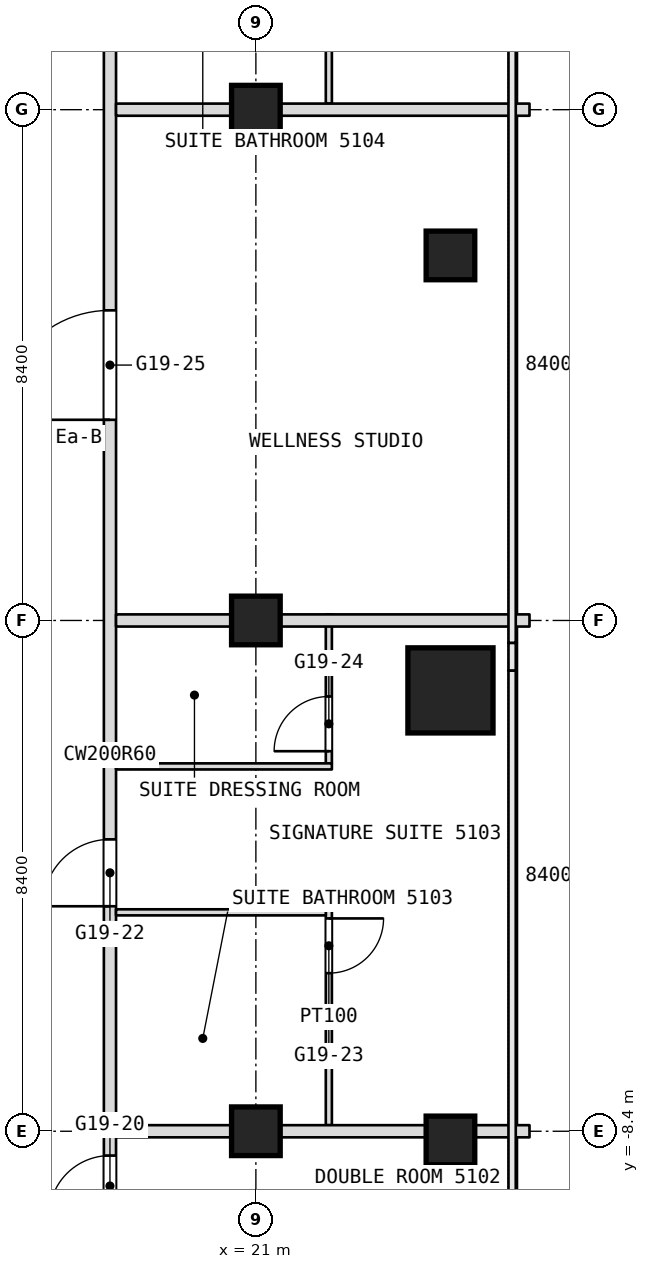
"""IFC4 building model, lengths in metres.
Left out: names, types, materials, properties, quantities, classifications, styles, units other than length and angle.
Written with IfcOpenShell. Run it as: python <this file> out.ifc"""

import sys

from ifc_helpers import new_model, si_unit, direction, frame, frame_2d, origin, origin_2d, place, context, subcontext, project, spatial, rectangle, extrude, element, fill, save


model = new_model("IFC4")
c1 = context("Model", 3, precision=1e-05, world=origin(), true_north=direction((0.0, 1.0)))
c2 = subcontext(c1, "Body", "Model", "MODEL_VIEW")
j1 = project(units=[si_unit("LENGTHUNIT", "METRE"), si_unit("PLANEANGLEUNIT", "RADIAN")], contexts=[c1])
p1 = place(None, origin())
s1 = spatial("IfcSite", under=j1, at=p1, CompositionType="ELEMENT")
p2 = place(p1, origin())
s2 = spatial("IfcBuilding", under=s1, at=p2, CompositionType="ELEMENT")
p3 = place(p2, frame((0.0, 0.0, 220.1)))
s3 = spatial("IfcBuildingStorey", under=s2, at=p3, CompositionType="ELEMENT", Elevation=220.1)
p4 = place(p3, frame((24.2, -1.15, 0.0), z_axis=(0.0, 0.0, 1.0), x_axis=(1.0, 0.0, 0.0)))
e1 = element("IfcColumn", 1, at=p4, inside=s3, PredefinedType="COLUMN", context=c2, shape_type="SweptSolid", body=[
    extrude(rectangle(XDim=1.4, YDim=1.4, at=origin_2d()), origin(), (0.0, 0.0, 1.0), 3.6),
])
for number, where, z_axis, x_axis in (
    (2, (21.0, -8.4, 0.0), (0.0, 0.0, 1.0), (1.0, 0.0, 0.0)),
    (3, (21.0, 0.0, 0.0), (0.0, 0.0, 1.0), (1.0, 0.0, 0.0)),
    (4, (21.0, 8.4, 0.0), (0.0, 0.0, 1.0), (1.0, 0.0, 0.0)),
    (5, (24.2, 6.003, 0.0), (0.0, 0.0, 1.0), (1.0, 0.0, 0.0)),
    (6, (24.2, -8.551, 0.0), (0.0, 0.0, 1.0), (1.0, 0.0, 0.0)),
):
    element("IfcColumn", number, at=place(p3, frame(where, z_axis=z_axis, x_axis=x_axis)), inside=s3, PredefinedType="COLUMN", context=c2, shape_type="SweptSolid", body=[
        extrude(rectangle(XDim=0.8, YDim=0.8, at=origin_2d()), origin(), (0.0, 0.0, 1.0), 3.6),
    ])
p5 = place(p3, frame((22.2, -8.3, 0.0), z_axis=(0.0, 0.0, 1.0), x_axis=(0.0, 1.0, 0.0)))
e7 = element("IfcWall", 7, at=p5, inside=s3, PredefinedType="PARTITIONING", context=c2, shape_type="SweptSolid", body=[
    extrude(rectangle(XDim=3.55, YDim=0.1, at=frame_2d((1.775, 0.0))), origin(), (0.0, 0.0, 1.0), 3.34),
])
p6 = place(p5, frame((2.5, 0.0, 0.0)))
e8 = element("IfcOpeningElement", 8, at=p6, cuts=e7, PredefinedType="OPENING", context=c2, shape_type="SweptSolid", body=[
    extrude(rectangle(XDim=0.9, YDim=2.1, at=frame_2d((0.45, 1.05))), frame((0.0, 0.05, 0.0), z_axis=(0.0, -1.0, 0.0), x_axis=(1.0, 0.0, 0.0)), (0.0, 0.0, 1.0), 0.1),
])
p7 = place(p3, frame((22.2, -2.35, 0.0), z_axis=(0.0, 0.0, 1.0), x_axis=(0.0, 1.0, 0.0)))
e9 = element("IfcWall", 9, at=p7, inside=s3, PredefinedType="PARTITIONING", context=c2, shape_type="SweptSolid", body=[
    extrude(rectangle(XDim=2.45, YDim=0.1, at=frame_2d((1.225, 0.0))), origin(), (0.0, 0.0, 1.0), 3.34),
])
p8 = place(p7, frame((0.2, 0.0, 0.0)))
e10 = element("IfcOpeningElement", 10, at=p8, cuts=e9, PredefinedType="OPENING", context=c2, shape_type="SweptSolid", body=[
    extrude(rectangle(XDim=0.9, YDim=2.1, at=frame_2d((0.45, 1.05))), frame((0.0, 0.05, 0.0), z_axis=(0.0, -1.0, 0.0), x_axis=(1.0, 0.0, 0.0)), (0.0, 0.0, 1.0), 0.1),
])
p9 = place(p3, frame((22.2, 8.5, 0.0), z_axis=(0.0, 0.0, 1.0), x_axis=(0.0, 1.0, 0.0)))
e11 = element("IfcWall", 11, at=p9, inside=s3, PredefinedType="PARTITIONING", context=c2, shape_type="SweptSolid", body=[
    extrude(rectangle(XDim=3.55, YDim=0.1, at=frame_2d((1.775, 0.0))), origin(), (0.0, 0.0, 1.0), 3.34),
])
p10 = place(p9, frame((2.5, 0.0, 0.0)))
e12 = element("IfcOpeningElement", 12, at=p10, cuts=e11, PredefinedType="OPENING", context=c2, shape_type="SweptSolid", body=[
    extrude(rectangle(XDim=0.9, YDim=2.1, at=frame_2d((0.45, 1.05))), frame((0.0, 0.05, 0.0), z_axis=(0.0, -1.0, 0.0), x_axis=(1.0, 0.0, 0.0)), (0.0, 0.0, 1.0), 0.1),
])
p11 = place(p3, frame((18.6, -26.751, 0.0), z_axis=(0.0, 0.0, 1.0), x_axis=(0.0, 1.0, 0.0)))
e13 = element("IfcWall", 13, at=p11, inside=s3, PredefinedType="PARTITIONING", context=c2, shape_type="SweptSolid", body=[
    extrude(rectangle(XDim=49.091, YDim=0.2, at=frame_2d((24.545, 0.0))), origin(), (0.0, 0.0, 1.0), 3.34),
])
p12 = place(p11, frame((4.226, 0.0, 0.0)))
e14 = element("IfcOpeningElement", 14, at=p12, cuts=e13, PredefinedType="OPENING", context=c2, shape_type="SweptSolid", body=[
    extrude(rectangle(XDim=1.8, YDim=2.1, at=frame_2d((0.9, 1.05))), frame((0.0, 0.1, 0.0), z_axis=(0.0, -1.0, 0.0), x_axis=(1.0, 0.0, 0.0)), (0.0, 0.0, 1.0), 0.2),
])
p13 = place(p11, frame((10.351, 0.0, 0.0)))
e15 = element("IfcOpeningElement", 15, at=p13, cuts=e13, PredefinedType="OPENING", context=c2, shape_type="SweptSolid", body=[
    extrude(rectangle(XDim=1.0, YDim=2.1, at=frame_2d((0.5, 1.05))), frame((0.0, 0.1, 0.0), z_axis=(0.0, -1.0, 0.0), x_axis=(1.0, 0.0, 0.0)), (0.0, 0.0, 1.0), 0.2),
])
p14 = place(p11, frame((16.951, 0.0, 0.0)))
e16 = element("IfcOpeningElement", 16, at=p14, cuts=e13, PredefinedType="OPENING", context=c2, shape_type="SweptSolid", body=[
    extrude(rectangle(XDim=1.0, YDim=2.1, at=frame_2d((0.5, 1.05))), frame((0.0, 0.1, 0.0), z_axis=(0.0, -1.0, 0.0), x_axis=(1.0, 0.0, 0.0)), (0.0, 0.0, 1.0), 0.2),
])
p15 = place(p11, frame((22.051, 0.0, 0.0)))
e17 = element("IfcOpeningElement", 17, at=p15, cuts=e13, PredefinedType="OPENING", context=c2, shape_type="SweptSolid", body=[
    extrude(rectangle(XDim=1.1, YDim=2.1, at=frame_2d((0.55, 1.05))), frame((0.0, 0.1, 0.0), z_axis=(0.0, -1.0, 0.0), x_axis=(1.0, 0.0, 0.0)), (0.0, 0.0, 1.0), 0.2),
])
p16 = place(p11, frame((30.051, 0.0, 0.0)))
e18 = element("IfcOpeningElement", 18, at=p16, cuts=e13, PredefinedType="OPENING", context=c2, shape_type="SweptSolid", body=[
    extrude(rectangle(XDim=1.8, YDim=2.1, at=frame_2d((0.9, 1.05))), frame((0.0, 0.1, 0.0), z_axis=(0.0, -1.0, 0.0), x_axis=(1.0, 0.0, 0.0)), (0.0, 0.0, 1.0), 0.2),
])
p17 = place(p11, frame((38.851, 0.0, 0.0)))
e19 = element("IfcOpeningElement", 19, at=p17, cuts=e13, PredefinedType="OPENING", context=c2, shape_type="SweptSolid", body=[
    extrude(rectangle(XDim=1.1, YDim=2.1, at=frame_2d((0.55, 1.05))), frame((0.0, 0.1, 0.0), z_axis=(0.0, -1.0, 0.0), x_axis=(1.0, 0.0, 0.0)), (0.0, 0.0, 1.0), 0.2),
])
p18 = place(p11, frame((44.051, 0.0, 0.0)))
e20 = element("IfcOpeningElement", 20, at=p18, cuts=e13, PredefinedType="OPENING", context=c2, shape_type="SweptSolid", body=[
    extrude(rectangle(XDim=1.0, YDim=2.1, at=frame_2d((0.5, 1.05))), frame((0.0, 0.1, 0.0), z_axis=(0.0, -1.0, 0.0), x_axis=(1.0, 0.0, 0.0)), (0.0, 0.0, 1.0), 0.2),
])
p19 = place(p3, frame((18.7, -8.4, 0.0), z_axis=(0.0, 0.0, 1.0), x_axis=(1.0, 0.0, 0.0)))
e21 = element("IfcWall", 21, at=p19, inside=s3, PredefinedType="PARTITIONING", context=c2, shape_type="SweptSolid", body=[
    extrude(rectangle(XDim=6.8, YDim=0.2, at=frame_2d((3.4, 0.0))), origin(), (0.0, 0.0, 1.0), 2.94),
])
p20 = place(p3, frame((18.7, -4.8, 0.0), z_axis=(0.0, 0.0, 1.0), x_axis=(1.0, 0.0, 0.0)))
e22 = element("IfcWall", 22, at=p20, inside=s3, PredefinedType="PARTITIONING", context=c2, shape_type="SweptSolid", body=[
    extrude(rectangle(XDim=3.45, YDim=0.1, at=frame_2d((1.725, 0.0))), origin(), (0.0, 0.0, 1.0), 3.34),
])
p21 = place(p3, frame((18.7, -2.4, 0.0), z_axis=(0.0, 0.0, 1.0), x_axis=(1.0, 0.0, 0.0)))
e23 = element("IfcWall", 23, at=p21, inside=s3, PredefinedType="PARTITIONING", context=c2, shape_type="SweptSolid", body=[
    extrude(rectangle(XDim=3.55, YDim=0.1, at=frame_2d((1.775, 0.0))), origin(), (0.0, 0.0, 1.0), 3.34),
])
for number, where, z_axis, x_axis in (
    (24, (18.7, 0.0, 0.0), (0.0, 0.0, 1.0), (1.0, 0.0, 0.0)),
    (25, (18.7, 8.4, 0.0), (0.0, 0.0, 1.0), (1.0, 0.0, 0.0)),
):
    element("IfcWall", number, at=place(p3, frame(where, z_axis=z_axis, x_axis=x_axis)), inside=s3, PredefinedType="PARTITIONING", context=c2, shape_type="SweptSolid", body=[
        extrude(rectangle(XDim=6.8, YDim=0.2, at=frame_2d((3.4, 0.0))), origin(), (0.0, 0.0, 1.0), 2.94),
    ])
p22 = place(p6, origin())
e26 = element("IfcDoor", 26, at=p22, inside=s3, OperationType="SINGLE_SWING_RIGHT", PredefinedType="DOOR", context=c2, shape_type="SweptSolid", body=[
    extrude(rectangle(XDim=0.9, YDim=2.1, at=frame_2d((0.45, 1.05))), frame((0.0, 0.025, 0.0), z_axis=(0.0, -1.0, 0.0), x_axis=(1.0, 0.0, 0.0)), (0.0, 0.0, 1.0), 0.05),
])
fill(e8, e26)
p23 = place(p8, origin())
e27 = element("IfcDoor", 27, at=p23, inside=s3, OperationType="SINGLE_SWING_LEFT", PredefinedType="DOOR", context=c2, shape_type="SweptSolid", body=[
    extrude(rectangle(XDim=0.9, YDim=2.1, at=frame_2d((0.45, 1.05))), frame((0.0, 0.025, 0.0), z_axis=(0.0, -1.0, 0.0), x_axis=(1.0, 0.0, 0.0)), (0.0, 0.0, 1.0), 0.05),
])
fill(e10, e27)
p24 = place(p14, origin())
e28 = element("IfcDoor", 28, at=p24, inside=s3, OperationType="SINGLE_SWING_RIGHT", PredefinedType="DOOR", context=c2, shape_type="SweptSolid", body=[
    extrude(rectangle(XDim=1.0, YDim=2.1, at=frame_2d((0.5, 1.05))), frame((0.0, 0.025, 0.0), z_axis=(0.0, -1.0, 0.0), x_axis=(1.0, 0.0, 0.0)), (0.0, 0.0, 1.0), 0.05),
])
fill(e16, e28)
p25 = place(p15, origin())
e29 = element("IfcDoor", 29, at=p25, inside=s3, OperationType="SINGLE_SWING_RIGHT", PredefinedType="DOOR", context=c2, shape_type="SweptSolid", body=[
    extrude(rectangle(XDim=1.1, YDim=2.1, at=frame_2d((0.55, 1.05))), frame((0.0, 0.025, 0.0), z_axis=(0.0, -1.0, 0.0), x_axis=(1.0, 0.0, 0.0)), (0.0, 0.0, 1.0), 0.05),
])
fill(e17, e29)
p26 = place(p16, origin())
e30 = element("IfcDoor", 30, at=p26, inside=s3, OperationType="DOUBLE_DOOR_SINGLE_SWING", PredefinedType="DOOR", context=c2, shape_type="SweptSolid", body=[
    extrude(rectangle(XDim=1.8, YDim=2.1, at=frame_2d((0.9, 1.05))), frame((0.0, 0.025, 0.0), z_axis=(0.0, -1.0, 0.0), x_axis=(1.0, 0.0, 0.0)), (0.0, 0.0, 1.0), 0.05),
])
fill(e18, e30)
save(model, sys.argv[1])
